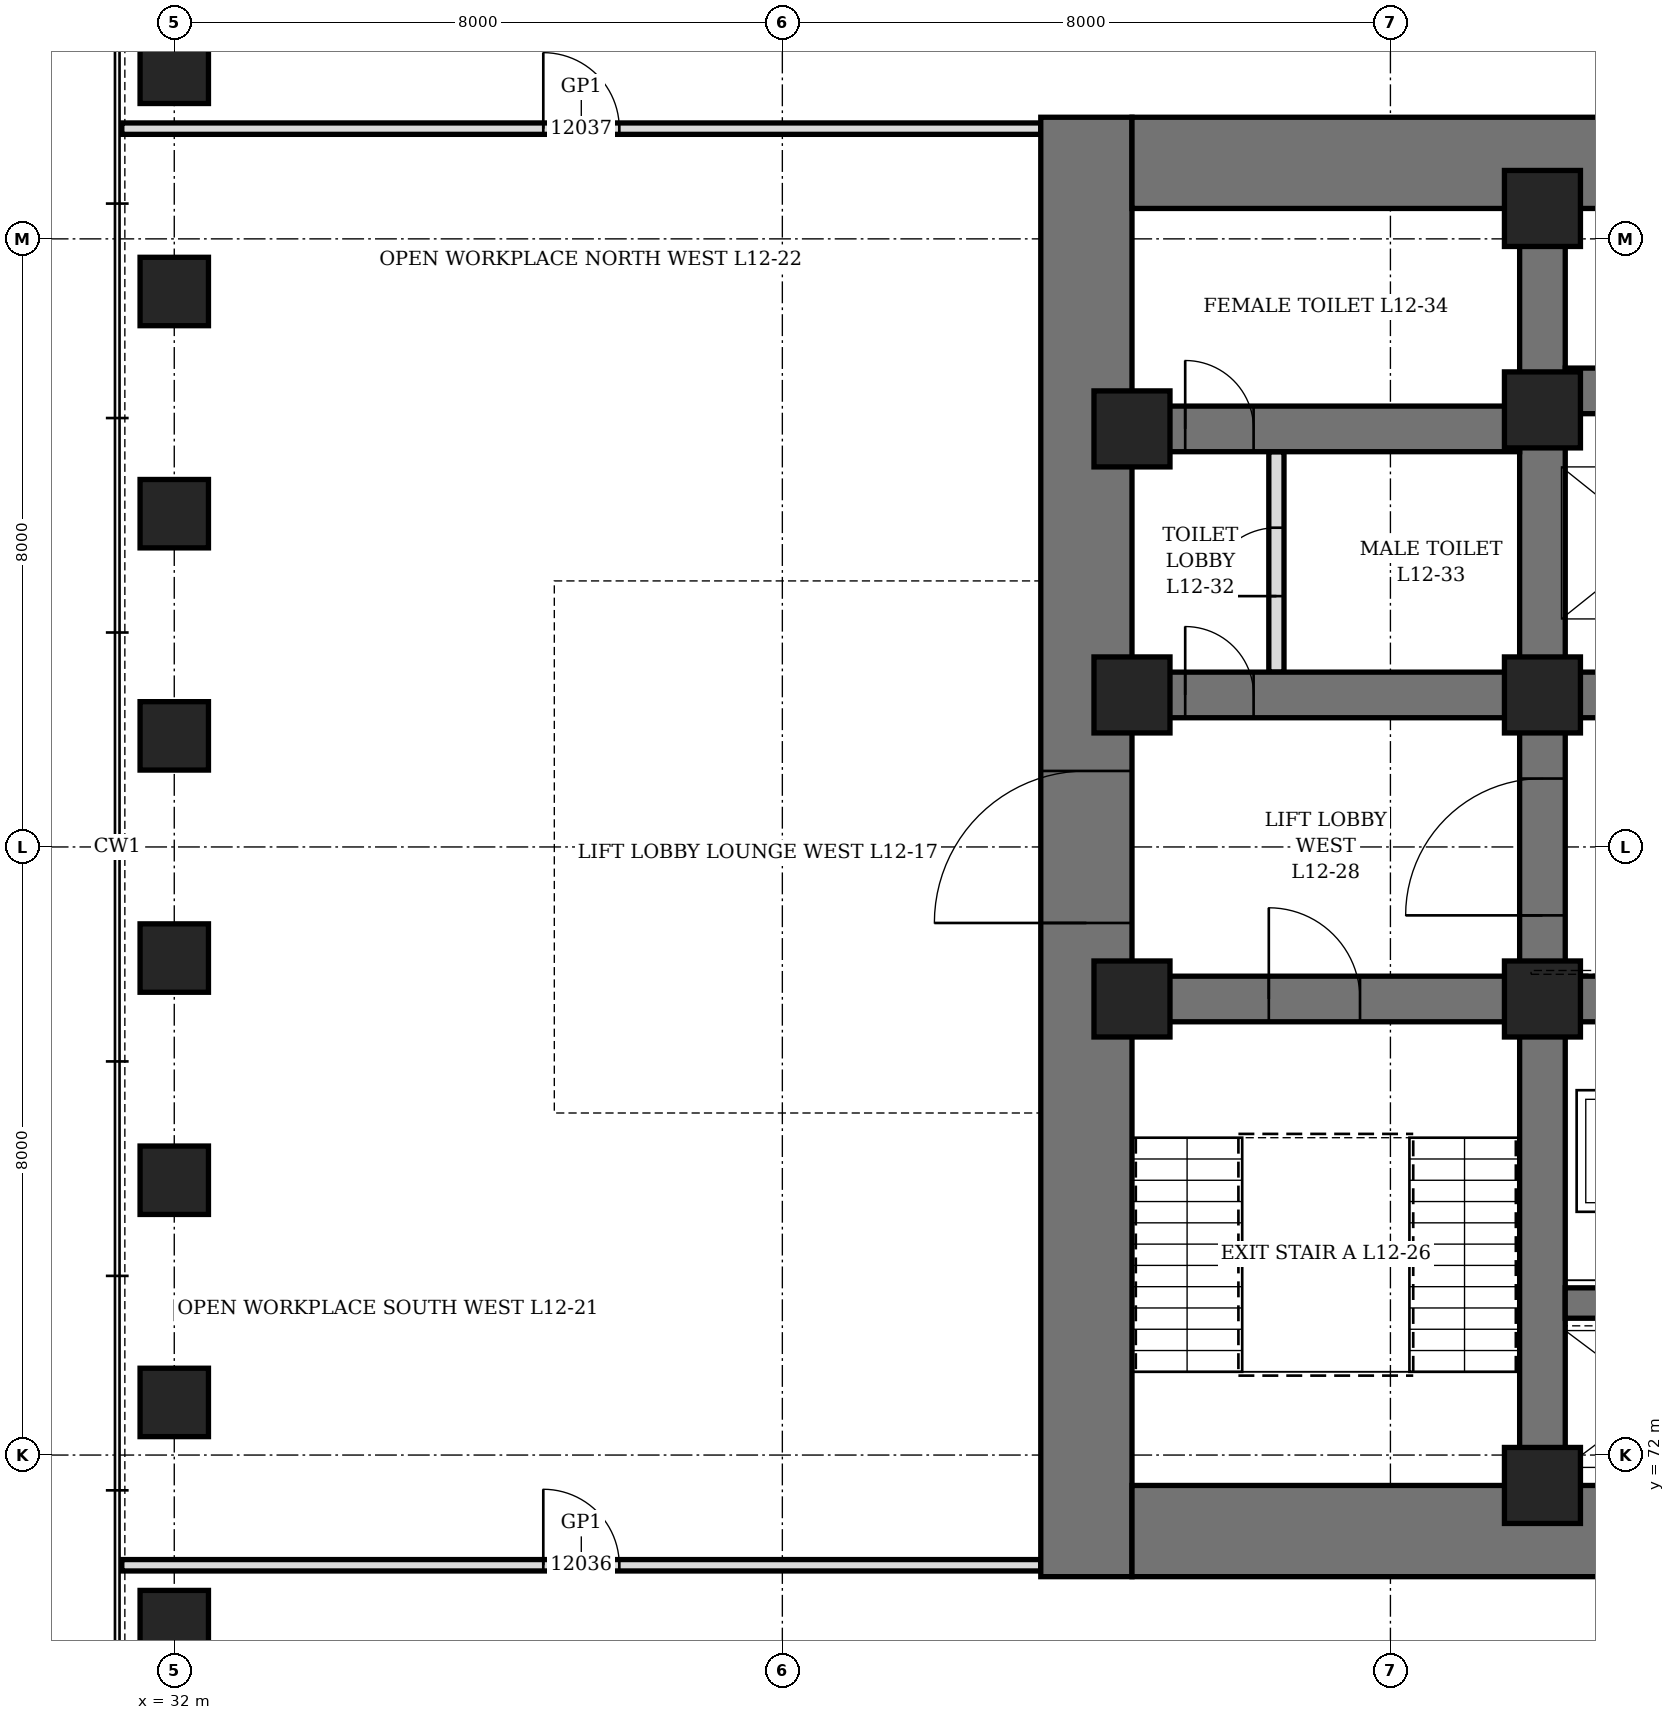
"""IFC4 building model, lengths in metres.
Left out: names, types, materials, properties, quantities, classifications, styles, units other than length and angle.
Written with IfcOpenShell. Run it as: python <this file> out.ifc"""

import sys

from ifc_helpers import new_model, si_unit, direction, frame, frame_2d, origin, origin_2d, place, context, subcontext, project, spatial, rectangle, hollow_rectangle, extrude, element, fill, save


model = new_model("IFC4")
c1 = context("Model", 3, precision=1e-05, world=origin(), true_north=direction((0.0, 1.0)))
c2 = subcontext(c1, "Body", "Model", "MODEL_VIEW")
j1 = project(units=[si_unit("LENGTHUNIT", "METRE"), si_unit("PLANEANGLEUNIT", "RADIAN")], contexts=[c1])
p1 = place(None, origin())
s1 = spatial("IfcSite", under=j1, at=p1, CompositionType="ELEMENT")
p2 = place(p1, origin())
s2 = spatial("IfcBuilding", under=s1, at=p2, CompositionType="ELEMENT")
p3 = place(p2, frame((0.0, 0.0, 60.1)))
s3 = spatial("IfcBuildingStorey", under=s2, at=p3, CompositionType="ELEMENT", Elevation=60.1)
for number, where, z_axis, x_axis in (
    (1, (32.0, 90.231, 0.0), (0.0, 0.0, 1.0), (0.0, 1.0, 0.0)),
    (2, (32.0, 87.308, 0.0), (0.0, 0.0, 1.0), (0.0, 1.0, 0.0)),
    (3, (32.0, 84.385, 0.0), (0.0, 0.0, 1.0), (0.0, 1.0, 0.0)),
    (4, (32.0, 81.461, 0.0), (0.0, 0.0, 1.0), (0.0, 1.0, 0.0)),
    (5, (32.0, 78.539, 0.0), (0.0, 0.0, 1.0), (0.0, 1.0, 0.0)),
    (6, (32.0, 75.615, 0.0), (0.0, 0.0, 1.0), (0.0, 1.0, 0.0)),
    (7, (32.0, 72.692, 0.0), (0.0, 0.0, 1.0), (0.0, 1.0, 0.0)),
    (8, (32.0, 69.769, 0.0), (0.0, 0.0, 1.0), (0.0, 1.0, 0.0)),
):
    element("IfcColumn", number, at=place(p3, frame(where, z_axis=z_axis, x_axis=x_axis)), inside=s3, PredefinedType="COLUMN", context=c2, shape_type="SweptSolid", body=[
        extrude(hollow_rectangle(XDim=0.9, YDim=0.9, WallThickness=0.12, at=origin_2d()), origin(), (0.0, 0.0, 1.0), 4.2),
    ])
p4 = place(p3, frame((44.0, 70.4, 0.0), z_axis=(0.0, 0.0, 1.0), x_axis=(0.0, 1.0, 0.0)))
e9 = element("IfcWall", 9, at=p4, inside=s3, PredefinedType="SHEAR", context=c2, shape_type="SweptSolid", body=[
    extrude(rectangle(XDim=19.2, YDim=1.2, at=frame_2d((9.6, 0.0))), origin(), (0.0, 0.0, 1.0), 4.2),
])
p5 = place(p4, frame((8.6, 0.0, 0.0)))
e10 = element("IfcOpeningElement", 10, at=p5, cuts=e9, PredefinedType="OPENING", context=c2, shape_type="SweptSolid", body=[
    extrude(rectangle(XDim=2.0, YDim=2.4, at=frame_2d((1.0, 1.2))), frame((0.0, 0.61, 0.0), z_axis=(0.0, -1.0, 0.0), x_axis=(1.0, 0.0, 0.0)), (0.0, 0.0, 1.0), 1.22),
])
p6 = place(p3, frame((44.6, 71.0, 0.0), z_axis=(0.0, 0.0, 1.0), x_axis=(1.0, 0.0, 0.0)))
e11 = element("IfcWall", 11, at=p6, inside=s3, PredefinedType="SHEAR", context=c2, shape_type="SweptSolid", body=[
    extrude(rectangle(XDim=22.8, YDim=1.2, at=frame_2d((11.4, 0.0))), origin(), (0.0, 0.0, 1.0), 4.2),
])
p7 = place(p3, frame((44.6, 89.0, 0.0), z_axis=(0.0, 0.0, 1.0), x_axis=(1.0, 0.0, 0.0)))
e12 = element("IfcWall", 12, at=p7, inside=s3, PredefinedType="SHEAR", context=c2, shape_type="SweptSolid", body=[
    extrude(rectangle(XDim=22.8, YDim=1.2, at=frame_2d((11.4, 0.0))), origin(), (0.0, 0.0, 1.0), 4.2),
])
p8 = place(p7, frame((7.9, 0.0, 0.0)))
e13 = element("IfcOpeningElement", 13, at=p8, cuts=e12, PredefinedType="OPENING", context=c2, shape_type="SweptSolid", body=[
    extrude(rectangle(XDim=1.0, YDim=2.1, at=frame_2d((0.5, 1.05))), frame((0.0, 0.61, 0.0), z_axis=(0.0, -1.0, 0.0), x_axis=(1.0, 0.0, 0.0)), (0.0, 0.0, 1.0), 1.22),
])
p9 = place(p7, frame((13.05, 0.0, 0.0)))
e14 = element("IfcOpeningElement", 14, at=p9, cuts=e12, PredefinedType="OPENING", context=c2, shape_type="SweptSolid", body=[
    extrude(rectangle(XDim=0.9, YDim=2.1, at=frame_2d((0.45, 1.05))), frame((0.0, 0.61, 0.0), z_axis=(0.0, -1.0, 0.0), x_axis=(1.0, 0.0, 0.0)), (0.0, 0.0, 1.0), 1.22),
])
p10 = place(p3, frame((50.0, 71.6, 0.0), z_axis=(0.0, 0.0, 1.0), x_axis=(0.0, 1.0, 0.0)))
e15 = element("IfcWall", 15, at=p10, inside=s3, PredefinedType="SHEAR", context=c2, shape_type="SweptSolid", body=[
    extrude(rectangle(XDim=16.8, YDim=0.6, at=frame_2d((8.4, 0.0))), origin(), (0.0, 0.0, 1.0), 4.2),
])
p11 = place(p10, frame((7.5, 0.0, 0.0)))
e16 = element("IfcOpeningElement", 16, at=p11, cuts=e15, PredefinedType="OPENING", context=c2, shape_type="SweptSolid", body=[
    extrude(rectangle(XDim=1.8, YDim=2.4, at=frame_2d((0.9, 1.2))), frame((0.0, 0.31, 0.0), z_axis=(0.0, -1.0, 0.0), x_axis=(1.0, 0.0, 0.0)), (0.0, 0.0, 1.0), 0.62),
])
p12 = place(p3, frame((44.6, 78.0, 0.0), z_axis=(0.0, 0.0, 1.0), x_axis=(1.0, 0.0, 0.0)))
e17 = element("IfcWall", 17, at=p12, inside=s3, PredefinedType="SHEAR", context=c2, shape_type="SweptSolid", body=[
    extrude(rectangle(XDim=5.1, YDim=0.6, at=frame_2d((2.55, 0.0))), origin(), (0.0, 0.0, 1.0), 4.2),
])
p13 = place(p12, frame((1.8, 0.0, 0.0)))
e18 = element("IfcOpeningElement", 18, at=p13, cuts=e17, PredefinedType="OPENING", context=c2, shape_type="SweptSolid", body=[
    extrude(rectangle(XDim=1.2, YDim=2.1, at=frame_2d((0.6, 1.05))), frame((0.0, 0.31, 0.0), z_axis=(0.0, -1.0, 0.0), x_axis=(1.0, 0.0, 0.0)), (0.0, 0.0, 1.0), 0.62),
])
p14 = place(p3, frame((44.6, 82.0, 0.0), z_axis=(0.0, 0.0, 1.0), x_axis=(1.0, 0.0, 0.0)))
e19 = element("IfcWall", 19, at=p14, inside=s3, PredefinedType="SHEAR", context=c2, shape_type="SweptSolid", body=[
    extrude(rectangle(XDim=5.1, YDim=0.6, at=frame_2d((2.55, 0.0))), origin(), (0.0, 0.0, 1.0), 4.2),
])
p15 = place(p14, frame((0.7, 0.0, 0.0)))
e20 = element("IfcOpeningElement", 20, at=p15, cuts=e19, PredefinedType="OPENING", context=c2, shape_type="SweptSolid", body=[
    extrude(rectangle(XDim=0.9, YDim=2.1, at=frame_2d((0.45, 1.05))), frame((0.0, 0.31, 0.0), z_axis=(0.0, -1.0, 0.0), x_axis=(1.0, 0.0, 0.0)), (0.0, 0.0, 1.0), 0.62),
])
p16 = place(p3, frame((44.6, 85.5, 0.0), z_axis=(0.0, 0.0, 1.0), x_axis=(1.0, 0.0, 0.0)))
e21 = element("IfcWall", 21, at=p16, inside=s3, PredefinedType="SHEAR", context=c2, shape_type="SweptSolid", body=[
    extrude(rectangle(XDim=5.1, YDim=0.6, at=frame_2d((2.55, 0.0))), origin(), (0.0, 0.0, 1.0), 4.2),
])
p17 = place(p16, frame((0.7, 0.0, 0.0)))
e22 = element("IfcOpeningElement", 22, at=p17, cuts=e21, PredefinedType="OPENING", context=c2, shape_type="SweptSolid", body=[
    extrude(rectangle(XDim=0.9, YDim=2.1, at=frame_2d((0.45, 1.05))), frame((0.0, 0.31, 0.0), z_axis=(0.0, -1.0, 0.0), x_axis=(1.0, 0.0, 0.0)), (0.0, 0.0, 1.0), 0.62),
])
p18 = place(p3, frame((50.3, 78.0, 0.0), z_axis=(0.0, 0.0, 1.0), x_axis=(1.0, 0.0, 0.0)))
e23 = element("IfcWall", 23, at=p18, inside=s3, PredefinedType="SHEAR", context=c2, shape_type="SweptSolid", body=[
    extrude(rectangle(XDim=11.4, YDim=0.6, at=frame_2d((5.7, 0.0))), origin(), (0.0, 0.0, 1.0), 4.2),
])
p19 = place(p18, frame((0.65, 0.0, 0.0)))
e24 = element("IfcOpeningElement", 24, at=p19, cuts=e23, PredefinedType="OPENING", context=c2, shape_type="SweptSolid", body=[
    extrude(rectangle(XDim=1.1, YDim=2.2, at=frame_2d((0.55, 1.1))), frame((0.0, 0.31, 0.0), z_axis=(0.0, -1.0, 0.0), x_axis=(1.0, 0.0, 0.0)), (0.0, 0.0, 1.0), 0.62),
])
p20 = place(p18, frame((3.65, 0.0, 0.0)))
e25 = element("IfcOpeningElement", 25, at=p20, cuts=e23, PredefinedType="OPENING", context=c2, shape_type="SweptSolid", body=[
    extrude(rectangle(XDim=1.1, YDim=2.2, at=frame_2d((0.55, 1.1))), frame((0.0, 0.31, 0.0), z_axis=(0.0, -1.0, 0.0), x_axis=(1.0, 0.0, 0.0)), (0.0, 0.0, 1.0), 0.62),
])
p21 = place(p18, frame((6.65, 0.0, 0.0)))
e26 = element("IfcOpeningElement", 26, at=p21, cuts=e23, PredefinedType="OPENING", context=c2, shape_type="SweptSolid", body=[
    extrude(rectangle(XDim=1.1, YDim=2.2, at=frame_2d((0.55, 1.1))), frame((0.0, 0.31, 0.0), z_axis=(0.0, -1.0, 0.0), x_axis=(1.0, 0.0, 0.0)), (0.0, 0.0, 1.0), 0.62),
])
p22 = place(p18, frame((9.65, 0.0, 0.0)))
e27 = element("IfcOpeningElement", 27, at=p22, cuts=e23, PredefinedType="OPENING", context=c2, shape_type="SweptSolid", body=[
    extrude(rectangle(XDim=1.1, YDim=2.2, at=frame_2d((0.55, 1.1))), frame((0.0, 0.31, 0.0), z_axis=(0.0, -1.0, 0.0), x_axis=(1.0, 0.0, 0.0)), (0.0, 0.0, 1.0), 0.62),
])
for number, where, z_axis, x_axis in (
    (28, (50.3, 82.0, 0.0), (0.0, 0.0, 1.0), (1.0, 0.0, 0.0)),
    (29, (50.3, 86.0, 0.0), (0.0, 0.0, 1.0), (1.0, 0.0, 0.0)),
):
    element("IfcWall", number, at=place(p3, frame(where, z_axis=z_axis, x_axis=x_axis)), inside=s3, PredefinedType="SHEAR", context=c2, shape_type="SweptSolid", body=[
        extrude(rectangle(XDim=11.4, YDim=0.6, at=frame_2d((5.7, 0.0))), origin(), (0.0, 0.0, 1.0), 4.2),
    ])
p23 = place(p3, frame((50.3, 74.0, 0.0), z_axis=(0.0, 0.0, 1.0), x_axis=(1.0, 0.0, 0.0)))
e30 = element("IfcWall", 30, at=p23, inside=s3, PredefinedType="SHEAR", context=c2, shape_type="SweptSolid", body=[
    extrude(rectangle(XDim=11.4, YDim=0.4, at=frame_2d((5.7, 0.0))), origin(), (0.0, 0.0, 1.0), 4.2),
])
for number, where, z_axis, x_axis in (
    (31, (44.6, 78.0, 0.0), (0.0, 0.0, 1.0), (1.0, 0.0, 0.0)),
    (32, (44.6, 82.0, 0.0), (0.0, 0.0, 1.0), (1.0, 0.0, 0.0)),
    (33, (44.6, 85.5, 0.0), (0.0, 0.0, 1.0), (1.0, 0.0, 0.0)),
    (34, (50.0, 71.6, 0.0), (0.0, 0.0, 1.0), (1.0, 0.0, 0.0)),
    (35, (50.0, 78.0, 0.0), (0.0, 0.0, 1.0), (1.0, 0.0, 0.0)),
    (36, (50.0, 82.0, 0.0), (0.0, 0.0, 1.0), (1.0, 0.0, 0.0)),
    (37, (50.0, 85.75, 0.0), (0.0, 0.0, 1.0), (1.0, 0.0, 0.0)),
    (38, (50.0, 88.4, 0.0), (0.0, 0.0, 1.0), (1.0, 0.0, 0.0)),
):
    element("IfcColumn", number, at=place(p3, frame(where, z_axis=z_axis, x_axis=x_axis)), inside=s3, PredefinedType="COLUMN", context=c2, shape_type="SweptSolid", body=[
        extrude(hollow_rectangle(XDim=1.0, YDim=1.0, WallThickness=0.15, at=origin_2d()), origin(), (0.0, 0.0, 1.0), 4.2),
    ])
p24 = place(p3, frame((46.5, 82.3, 0.0), z_axis=(0.0, 0.0, 1.0), x_axis=(0.0, 1.0, 0.0)))
e39 = element("IfcWall", 39, at=p24, inside=s3, PredefinedType="PARTITIONING", context=c2, shape_type="SweptSolid", body=[
    extrude(rectangle(XDim=2.9, YDim=0.2, at=frame_2d((1.45, 0.0))), origin(), (0.0, 0.0, 1.0), 4.04),
])
p25 = place(p24, frame((1.0, 0.0, 0.0)))
e40 = element("IfcOpeningElement", 40, at=p25, cuts=e39, PredefinedType="OPENING", context=c2, shape_type="SweptSolid", body=[
    extrude(rectangle(XDim=0.9, YDim=2.1, at=frame_2d((0.45, 1.05))), frame((0.0, 0.11, 0.0), z_axis=(0.0, -1.0, 0.0), x_axis=(1.0, 0.0, 0.0)), (0.0, 0.0, 1.0), 0.22),
])
p26 = place(p3, frame((31.31, 70.55, 0.0), z_axis=(0.0, 0.0, 1.0), x_axis=(1.0, 0.0, 0.0)))
e41 = element("IfcWall", 41, at=p26, inside=s3, PredefinedType="PARTITIONING", context=c2, shape_type="SweptSolid", body=[
    extrude(rectangle(XDim=12.09, YDim=0.15, at=frame_2d((6.045, 0.0))), origin(), (0.0, 0.0, 1.0), 4.04),
])
p27 = place(p26, frame((5.545, 0.0, 0.0)))
e42 = element("IfcOpeningElement", 42, at=p27, cuts=e41, PredefinedType="OPENING", context=c2, shape_type="SweptSolid", body=[
    extrude(rectangle(XDim=1.0, YDim=2.4, at=frame_2d((0.5, 1.2))), frame((0.0, 0.085, 0.0), z_axis=(0.0, -1.0, 0.0), x_axis=(1.0, 0.0, 0.0)), (0.0, 0.0, 1.0), 0.17),
])
p28 = place(p3, frame((31.31, 89.45, 0.0), z_axis=(0.0, 0.0, 1.0), x_axis=(1.0, 0.0, 0.0)))
e43 = element("IfcWall", 43, at=p28, inside=s3, PredefinedType="PARTITIONING", context=c2, shape_type="SweptSolid", body=[
    extrude(rectangle(XDim=12.09, YDim=0.15, at=frame_2d((6.045, 0.0))), origin(), (0.0, 0.0, 1.0), 4.04),
])
p29 = place(p28, frame((5.545, 0.0, 0.0)))
e44 = element("IfcOpeningElement", 44, at=p29, cuts=e43, PredefinedType="OPENING", context=c2, shape_type="SweptSolid", body=[
    extrude(rectangle(XDim=1.0, YDim=2.4, at=frame_2d((0.5, 1.2))), frame((0.0, 0.085, 0.0), z_axis=(0.0, -1.0, 0.0), x_axis=(1.0, 0.0, 0.0)), (0.0, 0.0, 1.0), 0.17),
])
p30 = place(p15, origin())
e45 = element("IfcDoor", 45, at=p30, inside=s3, OperationType="SINGLE_SWING_LEFT", PredefinedType="DOOR", context=c2, shape_type="SweptSolid", body=[
    extrude(rectangle(XDim=0.9, YDim=2.1, at=frame_2d((0.45, 1.05))), frame((0.0, 0.3, 0.0), z_axis=(0.0, -1.0, 0.0), x_axis=(1.0, 0.0, 0.0)), (0.0, 0.0, 1.0), 0.6),
])
fill(e20, e45)
p31 = place(p25, origin())
e46 = element("IfcDoor", 46, at=p31, inside=s3, OperationType="SINGLE_SWING_RIGHT", PredefinedType="DOOR", context=c2, shape_type="SweptSolid", body=[
    extrude(rectangle(XDim=0.9, YDim=2.1, at=frame_2d((0.45, 1.05))), frame((0.0, 0.1, 0.0), z_axis=(0.0, -1.0, 0.0), x_axis=(1.0, 0.0, 0.0)), (0.0, 0.0, 1.0), 0.199),
])
fill(e40, e46)
p32 = place(p17, origin())
e47 = element("IfcDoor", 47, at=p32, inside=s3, OperationType="SINGLE_SWING_RIGHT", PredefinedType="DOOR", context=c2, shape_type="SweptSolid", body=[
    extrude(rectangle(XDim=0.9, YDim=2.1, at=frame_2d((0.45, 1.05))), frame((0.0, 0.3, 0.0), z_axis=(0.0, -1.0, 0.0), x_axis=(1.0, 0.0, 0.0)), (0.0, 0.0, 1.0), 0.6),
])
fill(e22, e47)
p33 = place(p13, origin())
e48 = element("IfcDoor", 48, at=p33, inside=s3, OperationType="SINGLE_SWING_LEFT", PredefinedType="DOOR", context=c2, shape_type="SweptSolid", body=[
    extrude(rectangle(XDim=1.2, YDim=2.1, at=frame_2d((0.6, 1.05))), frame((0.0, 0.3, 0.0), z_axis=(0.0, -1.0, 0.0), x_axis=(1.0, 0.0, 0.0)), (0.0, 0.0, 1.0), 0.6),
])
fill(e18, e48)
p34 = place(p5, origin())
e49 = element("IfcDoor", 49, at=p34, inside=s3, OperationType="DOUBLE_DOOR_SINGLE_SWING", PredefinedType="DOOR", context=c2, shape_type="SweptSolid", body=[
    extrude(rectangle(XDim=2.0, YDim=2.4, at=frame_2d((1.0, 1.2))), frame((0.0, 0.35, 0.0), z_axis=(0.0, -1.0, 0.0), x_axis=(1.0, 0.0, 0.0)), (0.0, 0.0, 1.0), 0.7),
])
fill(e10, e49)
p35 = place(p11, origin())
e50 = element("IfcDoor", 50, at=p35, inside=s3, OperationType="DOUBLE_DOOR_SINGLE_SWING", PredefinedType="DOOR", context=c2, shape_type="SweptSolid", body=[
    extrude(rectangle(XDim=1.8, YDim=2.4, at=frame_2d((0.9, 1.2))), frame((0.0, 0.3, 0.0), z_axis=(0.0, -1.0, 0.0), x_axis=(1.0, 0.0, 0.0)), (0.0, 0.0, 1.0), 0.6),
])
fill(e16, e50)
p36 = place(p27, origin())
e51 = element("IfcDoor", 51, at=p36, inside=s3, OperationType="SINGLE_SWING_RIGHT", PredefinedType="DOOR", context=c2, shape_type="SweptSolid", body=[
    extrude(rectangle(XDim=1.0, YDim=2.4, at=frame_2d((0.5, 1.2))), frame((0.0, 0.075, 0.0), z_axis=(0.0, -1.0, 0.0), x_axis=(1.0, 0.0, 0.0)), (0.0, 0.0, 1.0), 0.149),
])
fill(e42, e51)
p37 = place(p29, origin())
e52 = element("IfcDoor", 52, at=p37, inside=s3, OperationType="SINGLE_SWING_RIGHT", PredefinedType="DOOR", context=c2, shape_type="SweptSolid", body=[
    extrude(rectangle(XDim=1.0, YDim=2.4, at=frame_2d((0.5, 1.2))), frame((0.0, 0.075, 0.0), z_axis=(0.0, -1.0, 0.0), x_axis=(1.0, 0.0, 0.0)), (0.0, 0.0, 1.0), 0.149),
])
fill(e44, e52)
save(model, sys.argv[1])
